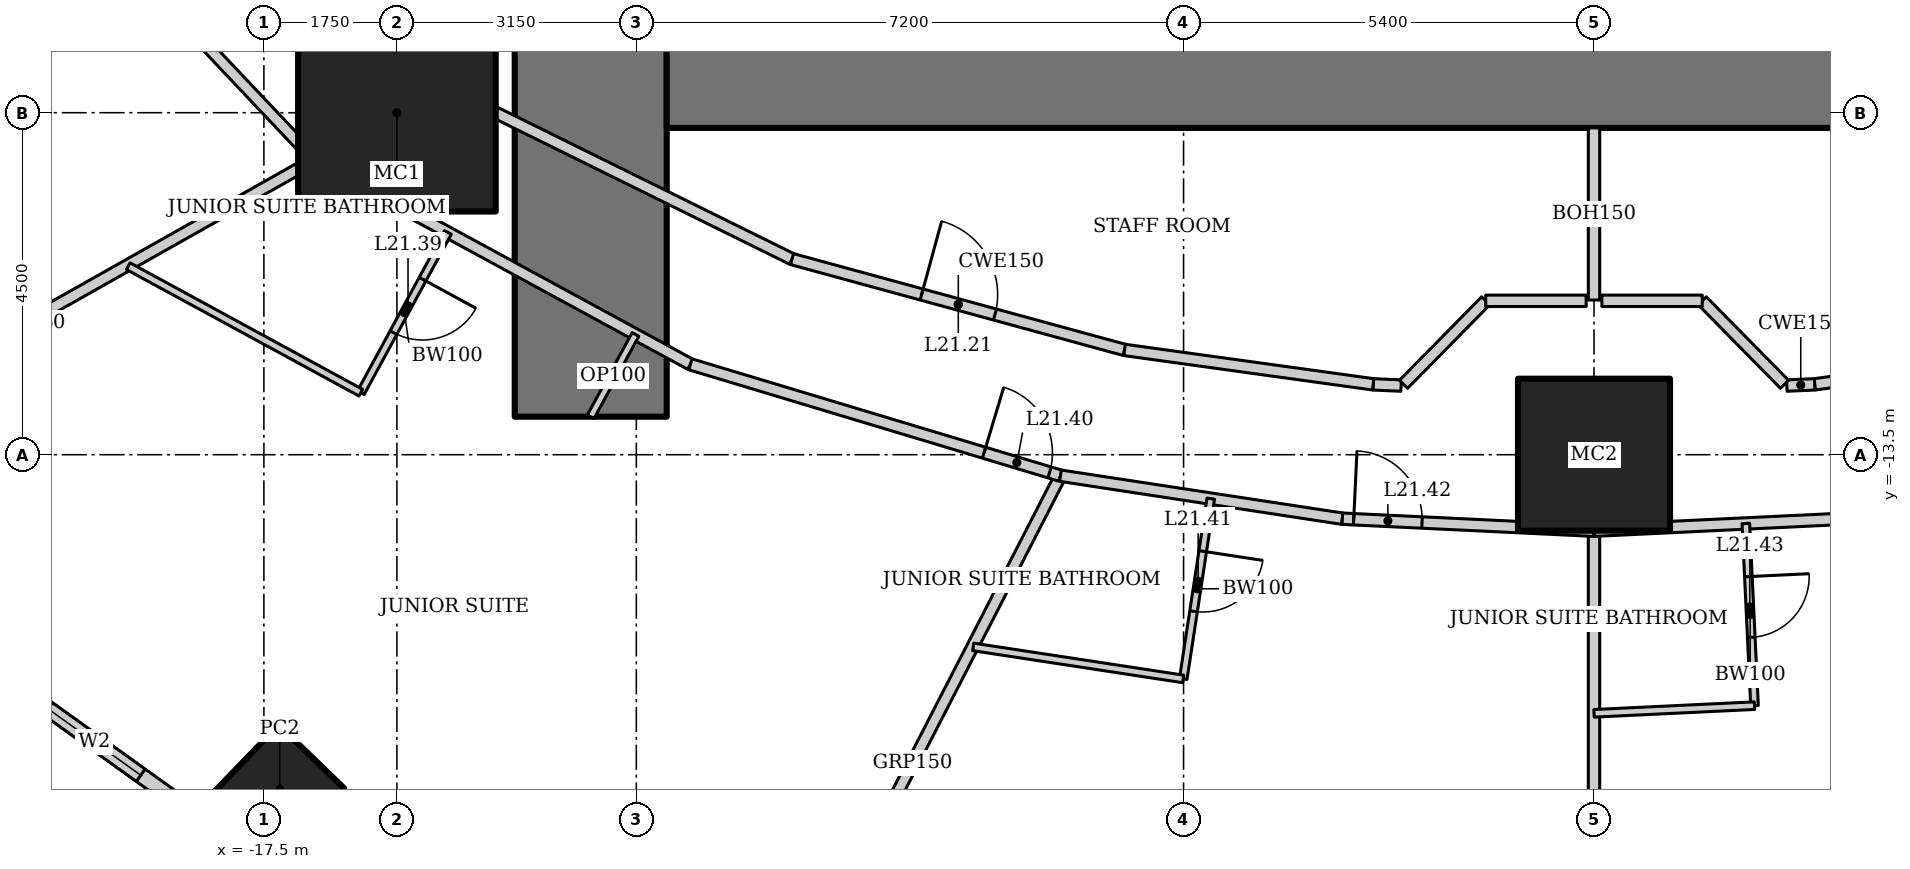
"""IFC4 building model, lengths in metres.
Left out: names, types, materials, properties, quantities, classifications, styles, units other than length and angle.
Written with IfcOpenShell. Run it as: python <this file> out.ifc"""

import sys

from ifc_helpers import new_model, si_unit, direction, frame, frame_2d, origin, origin_2d, place, context, subcontext, project, spatial, rectangle, hollow_rectangle, extrude, element, fill, save


model = new_model("IFC4")
c1 = context("Model", 3, precision=1e-05, world=origin(), true_north=direction((0.0, 1.0)))
c2 = subcontext(c1, "Body", "Model", "MODEL_VIEW")
j1 = project(units=[si_unit("LENGTHUNIT", "METRE"), si_unit("PLANEANGLEUNIT", "RADIAN")], contexts=[c1])
p1 = place(None, origin())
s1 = spatial("IfcSite", under=j1, at=p1, CompositionType="ELEMENT")
p2 = place(p1, origin())
s2 = spatial("IfcBuilding", under=s1, at=p2, CompositionType="ELEMENT")
p3 = place(p2, frame((0.0, 0.0, 91.0)))
s3 = spatial("IfcBuildingStorey", under=s2, at=p3, CompositionType="ELEMENT", Elevation=91.0)
p4 = place(p3, frame((-15.75, -9.0, 0.0), z_axis=(0.0, 0.0, 1.0), x_axis=(1.0, 0.0, 0.0)))
e1 = element("IfcColumn", 1, at=p4, inside=s3, PredefinedType="COLUMN", context=c2, shape_type="SweptSolid", body=[
    extrude(hollow_rectangle(XDim=2.6, YDim=2.6, WallThickness=0.13, at=origin_2d()), origin(), (0.0, 0.0, 1.0), 3.6),
])
p5 = place(p3, frame((0.0, -13.5, 0.0), z_axis=(0.0, 0.0, 1.0), x_axis=(1.0, 0.0, 0.0)))
e2 = element("IfcColumn", 2, at=p5, inside=s3, PredefinedType="COLUMN", context=c2, shape_type="SweptSolid", body=[
    extrude(hollow_rectangle(XDim=2.0, YDim=2.0, WallThickness=0.17, at=origin_2d()), origin(), (0.0, 0.0, 1.0), 3.6),
])
p6 = place(p3, frame((-17.291, -17.905, 0.0), z_axis=(0.0, 0.0, 1.0), x_axis=(0.694658370459, 0.719339800339, 0.0)))
e3 = element("IfcColumn", 3, at=p6, inside=s3, PredefinedType="COLUMN", context=c2, shape_type="SweptSolid", body=[
    extrude(hollow_rectangle(XDim=1.2, YDim=1.2, WallThickness=0.1, at=origin_2d()), origin(), (0.0, 0.0, 1.0), 3.6),
])
p7 = place(p3, frame((-13.2, 13.0, 0.0), z_axis=(0.0, 0.0, 1.0), x_axis=(0.0, -1.0, 0.0)))
e4 = element("IfcWall", 4, at=p7, inside=s3, PredefinedType="SHEAR", context=c2, shape_type="SweptSolid", body=[
    extrude(rectangle(XDim=26.0, YDim=2.0, at=frame_2d((13.0, 0.0))), origin(), (0.0, 0.0, 1.0), 3.6),
])
p8 = place(p7, frame((12.1, 0.0, 0.0)))
e5 = element("IfcOpeningElement", 5, at=p8, cuts=e4, PredefinedType="OPENING", context=c2, shape_type="SweptSolid", body=[
    extrude(rectangle(XDim=1.8, YDim=2.1, at=frame_2d((0.9, 1.05))), frame((0.0, 1.01, 0.0), z_axis=(0.0, -1.0, 0.0), x_axis=(1.0, 0.0, 0.0)), (0.0, 0.0, 1.0), 2.02),
])
p9 = place(p3, frame((-12.2, -8.0, 0.0), z_axis=(0.0, 0.0, 1.0), x_axis=(1.0, 0.0, 0.0)))
e6 = element("IfcWall", 6, at=p9, inside=s3, PredefinedType="SHEAR", context=c2, shape_type="SweptSolid", body=[
    extrude(rectangle(XDim=24.4, YDim=2.4, at=frame_2d((12.2, 0.0))), origin(), (0.0, 0.0, 1.0), 3.6),
])
p10 = place(p3, frame((-24.482, -13.875, 0.0), z_axis=(0.0, 0.0, 1.0), x_axis=(0.812791321576, -0.582554948112, 0.0)))
e7 = element("IfcWall", 7, at=p10, inside=s3, PredefinedType="SOLIDWALL", context=c2, shape_type="SweptSolid", body=[
    extrude(rectangle(XDim=8.063, YDim=0.2, at=frame_2d((4.032, 0.0))), origin(), (0.0, 0.0, 1.0), 3.45),
])
p11 = place(p10, frame((1.466, 0.0, 0.5)))
e8 = element("IfcOpeningElement", 8, at=p11, cuts=e7, PredefinedType="OPENING", context=c2, shape_type="SweptSolid", body=[
    extrude(rectangle(XDim=1.5, YDim=2.2, at=frame_2d((0.75, 1.1))), frame((0.0, 0.11, 0.0), z_axis=(0.0, -1.0, 0.0), x_axis=(1.0, 0.0, 0.0)), (0.0, 0.0, 1.0), 0.22),
])
p12 = place(p10, frame((5.097, 0.0, 0.5)))
e9 = element("IfcOpeningElement", 9, at=p12, cuts=e7, PredefinedType="OPENING", context=c2, shape_type="SweptSolid", body=[
    extrude(rectangle(XDim=1.5, YDim=2.2, at=frame_2d((0.75, 1.1))), frame((0.0, 0.11, 0.0), z_axis=(0.0, -1.0, 0.0), x_axis=(1.0, 0.0, 0.0)), (0.0, 0.0, 1.0), 0.22),
])
p13 = place(p3, frame((-24.435, -13.909, 0.0), z_axis=(0.0, 0.0, 1.0), x_axis=(0.87090601027, 0.491449612143, 0.0)))
e10 = element("IfcWall", 10, at=p13, inside=s3, PredefinedType="PARTITIONING", context=c2, shape_type="SweptSolid", body=[
    extrude(rectangle(XDim=8.726, YDim=0.15, at=frame_2d((4.363, 0.0))), origin(), (0.0, 0.0, 1.0), 2.693),
])
p14 = place(p3, frame((-10.912, -21.346, 0.0), z_axis=(0.0, 0.0, 1.0), x_axis=(0.457327273085, 0.889298468059, 0.0)))
e11 = element("IfcWall", 11, at=p14, inside=s3, PredefinedType="PARTITIONING", context=c2, shape_type="SweptSolid", body=[
    extrude(rectangle(XDim=8.511, YDim=0.15, at=frame_2d((4.256, 0.0))), origin(), (0.0, 0.0, 1.0), 2.528),
])
p15 = place(p3, frame((0.0, -22.825, 0.0), z_axis=(0.0, 0.0, 1.0), x_axis=(0.0, 1.0, 0.0)))
e12 = element("IfcWall", 12, at=p15, inside=s3, PredefinedType="PARTITIONING", context=c2, shape_type="SweptSolid", body=[
    extrude(rectangle(XDim=8.325, YDim=0.15, at=frame_2d((4.162, 0.0))), origin(), (0.0, 0.0, 1.0), 2.924),
])
p16 = place(p3, frame((-20.984, -5.232, 0.0), z_axis=(0.0, 0.0, 1.0), x_axis=(0.687062608696, -0.726598218916, 0.0)))
e13 = element("IfcWall", 13, at=p16, inside=s3, PredefinedType="PARTITIONING", context=c2, shape_type="SweptSolid", body=[
    extrude(rectangle(XDim=6.039, YDim=0.15, at=frame_2d((3.02, 0.0))), origin(), (0.0, 0.0, 1.0), 3.45),
])
p17 = place(p16, frame((0.15, 0.0, 0.0)))
e14 = element("IfcOpeningElement", 14, at=p17, cuts=e13, PredefinedType="OPENING", context=c2, shape_type="SweptSolid", body=[
    extrude(rectangle(XDim=0.9, YDim=2.1, at=frame_2d((0.45, 1.05))), frame((0.0, 0.085, 0.0), z_axis=(0.0, -1.0, 0.0), x_axis=(1.0, 0.0, 0.0)), (0.0, 0.0, 1.0), 0.17),
])
p18 = place(p3, frame((-16.835, -9.62, 0.0), z_axis=(0.0, 0.0, 1.0), x_axis=(0.878450059298, -0.477834169267, 0.0)))
e15 = element("IfcWall", 15, at=p18, inside=s3, PredefinedType="PARTITIONING", context=c2, shape_type="SweptSolid", body=[
    extrude(rectangle(XDim=5.631, YDim=0.15, at=frame_2d((2.815, 0.0))), origin(), (0.0, 0.0, 1.0), 3.45),
])
p19 = place(p3, frame((-11.888, -12.311, 0.0), z_axis=(0.0, 0.0, 1.0), x_axis=(0.957564241242, -0.288219922793, 0.0)))
e16 = element("IfcWall", 16, at=p19, inside=s3, PredefinedType="PARTITIONING", context=c2, shape_type="SweptSolid", body=[
    extrude(rectangle(XDim=5.085, YDim=0.15, at=frame_2d((2.542, 0.0))), origin(), (0.0, 0.0, 1.0), 3.45),
])
p20 = place(p19, frame((4.035, 0.0, 0.0)))
e17 = element("IfcOpeningElement", 17, at=p20, cuts=e16, PredefinedType="OPENING", context=c2, shape_type="SweptSolid", body=[
    extrude(rectangle(XDim=0.9, YDim=2.1, at=frame_2d((0.45, 1.05))), frame((0.0, 0.085, 0.0), z_axis=(0.0, -1.0, 0.0), x_axis=(1.0, 0.0, 0.0)), (0.0, 0.0, 1.0), 0.17),
])
p21 = place(p3, frame((-7.019, -13.776, 0.0), z_axis=(0.0, 0.0, 1.0), x_axis=(0.988564270062, -0.150800145746, 0.0)))
e18 = element("IfcWall", 18, at=p21, inside=s3, PredefinedType="PARTITIONING", context=c2, shape_type="SweptSolid", body=[
    extrude(rectangle(XDim=3.751, YDim=0.15, at=frame_2d((1.875, 0.0))), origin(), (0.0, 0.0, 1.0), 3.45),
])
p22 = place(p3, frame((-3.311, -14.342, 0.0), z_axis=(0.0, 0.0, 1.0), x_axis=(0.998863968075, -0.047652631422, 0.0)))
e19 = element("IfcWall", 19, at=p22, inside=s3, PredefinedType="PARTITIONING", context=c2, shape_type="SweptSolid", body=[
    extrude(rectangle(XDim=3.315, YDim=0.15, at=frame_2d((1.657, 0.0))), origin(), (0.0, 0.0, 1.0), 3.45),
])
p23 = place(p22, frame((0.15, 0.0, 0.0)))
e20 = element("IfcOpeningElement", 20, at=p23, cuts=e19, PredefinedType="OPENING", context=c2, shape_type="SweptSolid", body=[
    extrude(rectangle(XDim=0.9, YDim=2.1, at=frame_2d((0.45, 1.05))), frame((0.0, 0.085, 0.0), z_axis=(0.0, -1.0, 0.0), x_axis=(1.0, 0.0, 0.0)), (0.0, 0.0, 1.0), 0.17),
])
p24 = place(p3, frame((0.0, -14.5, 0.0), z_axis=(0.0, 0.0, 1.0), x_axis=(0.998863968075, 0.047652631422, 0.0)))
e21 = element("IfcWall", 21, at=p24, inside=s3, PredefinedType="PARTITIONING", context=c2, shape_type="SweptSolid", body=[
    extrude(rectangle(XDim=3.315, YDim=0.15, at=frame_2d((1.657, 0.0))), origin(), (0.0, 0.0, 1.0), 3.45),
])
p25 = place(p3, frame((-19.177, -4.781, 0.0), z_axis=(0.0, 0.0, 1.0), x_axis=(0.720837261072, -0.693104352209, 0.0)))
e22 = element("IfcWall", 22, at=p25, inside=s3, PredefinedType="PARTITIONING", context=c2, shape_type="SweptSolid", body=[
    extrude(rectangle(XDim=5.59, YDim=0.15, at=frame_2d((2.795, 0.0))), origin(), (0.0, 0.0, 1.0), 3.45),
])
p26 = place(p25, frame((2.295, 0.0, 0.0)))
e23 = element("IfcOpeningElement", 23, at=p26, cuts=e22, PredefinedType="OPENING", context=c2, shape_type="SweptSolid", body=[
    extrude(rectangle(XDim=1.0, YDim=2.1, at=frame_2d((0.5, 1.05))), frame((0.0, 0.085, 0.0), z_axis=(0.0, -1.0, 0.0), x_axis=(1.0, 0.0, 0.0)), (0.0, 0.0, 1.0), 0.17),
])
p27 = place(p3, frame((-15.147, -8.656, 0.0), z_axis=(0.0, 0.0, 1.0), x_axis=(0.89656943448, -0.442903205177, 0.0)))
e24 = element("IfcWall", 24, at=p27, inside=s3, PredefinedType="PARTITIONING", context=c2, shape_type="SweptSolid", body=[
    extrude(rectangle(XDim=5.126, YDim=0.15, at=frame_2d((2.563, 0.0))), origin(), (0.0, 0.0, 1.0), 3.45),
])
p28 = place(p3, frame((-10.551, -10.926, 0.0), z_axis=(0.0, 0.0, 1.0), x_axis=(0.964644466646, -0.263554648923, 0.0)))
e25 = element("IfcWall", 25, at=p28, inside=s3, PredefinedType="PARTITIONING", context=c2, shape_type="SweptSolid", body=[
    extrude(rectangle(XDim=4.535, YDim=0.15, at=frame_2d((2.268, 0.0))), origin(), (0.0, 0.0, 1.0), 3.45),
])
p29 = place(p28, frame((1.768, 0.0, 0.0)))
e26 = element("IfcOpeningElement", 26, at=p29, cuts=e25, PredefinedType="OPENING", context=c2, shape_type="SweptSolid", body=[
    extrude(rectangle(XDim=1.0, YDim=2.1, at=frame_2d((0.5, 1.05))), frame((0.0, 0.085, 0.0), z_axis=(0.0, -1.0, 0.0), x_axis=(1.0, 0.0, 0.0)), (0.0, 0.0, 1.0), 0.17),
])
for number, where, z_axis, x_axis in (
    (27, (-6.176, -12.122, 0.0), (0.0, 0.0, 1.0), (0.991, -0.137, 0.0)),
    (28, (2.903, -12.574, 0.0), (0.0, 0.0, 1.0), (0.991, 0.137, 0.0)),
):
    element("IfcWall", number, at=place(p3, frame(where, z_axis=z_axis, x_axis=x_axis)), inside=s3, PredefinedType="PARTITIONING", context=c2, shape_type="SweptSolid", body=[
        extrude(rectangle(XDim=3.304, YDim=0.15, at=frame_2d((1.652, 0.0))), origin(), (0.0, 0.0, 1.0), 3.45),
    ])
p30 = place(p3, frame((-15.078, -10.576, 0.0), z_axis=(0.0, 0.0, 1.0), x_axis=(-0.477832549678, -0.878450940274, 0.0)))
e29 = element("IfcWall", 29, at=p30, inside=s3, PredefinedType="PARTITIONING", context=c2, shape_type="SweptSolid", body=[
    extrude(rectangle(XDim=2.4, YDim=0.1, at=frame_2d((1.2, 0.0))), origin(), (0.0, 0.0, 1.0), 3.45),
])
p31 = place(p30, frame((0.7, 0.0, 0.0)))
e30 = element("IfcOpeningElement", 30, at=p31, cuts=e29, PredefinedType="OPENING", context=c2, shape_type="SweptSolid", body=[
    extrude(rectangle(XDim=0.8, YDim=2.1, at=frame_2d((0.4, 1.05))), frame((0.0, 0.06, 0.0), z_axis=(0.0, -1.0, 0.0), x_axis=(1.0, 0.0, 0.0)), (0.0, 0.0, 1.0), 0.12),
])
p32 = place(p3, frame((-16.225, -12.684, 0.0), z_axis=(0.0, 0.0, 1.0), x_axis=(-0.878473578893, 0.477790928322, 0.0)))
e31 = element("IfcWall", 31, at=p32, inside=s3, PredefinedType="PARTITIONING", context=c2, shape_type="SweptSolid", body=[
    extrude(rectangle(XDim=3.483, YDim=0.1, at=frame_2d((1.741, 0.0))), origin(), (0.0, 0.0, 1.0), 3.45),
])
p33 = place(p3, frame((-5.042, -14.078, 0.0), z_axis=(0.0, 0.0, 1.0), x_axis=(-0.150856962013, -0.988555601376, 0.0)))
e32 = element("IfcWall", 32, at=p33, inside=s3, PredefinedType="PARTITIONING", context=c2, shape_type="SweptSolid", body=[
    extrude(rectangle(XDim=2.4, YDim=0.1, at=frame_2d((1.2, 0.0))), origin(), (0.0, 0.0, 1.0), 3.45),
])
p34 = place(p33, frame((0.7, 0.0, 0.0)))
e33 = element("IfcOpeningElement", 33, at=p34, cuts=e32, PredefinedType="OPENING", context=c2, shape_type="SweptSolid", body=[
    extrude(rectangle(XDim=0.8, YDim=2.1, at=frame_2d((0.4, 1.05))), frame((0.0, 0.06, 0.0), z_axis=(0.0, -1.0, 0.0), x_axis=(1.0, 0.0, 0.0)), (0.0, 0.0, 1.0), 0.12),
])
p35 = place(p3, frame((-5.404, -16.45, 0.0), z_axis=(0.0, 0.0, 1.0), x_axis=(-0.988568792086, 0.150770498819, 0.0)))
e34 = element("IfcWall", 34, at=p35, inside=s3, PredefinedType="PARTITIONING", context=c2, shape_type="SweptSolid", body=[
    extrude(rectangle(XDim=2.795, YDim=0.1, at=frame_2d((1.397, 0.0))), origin(), (0.0, 0.0, 1.0), 3.45),
])
p36 = place(p3, frame((1.998, -14.405, 0.0), z_axis=(0.0, 0.0, 1.0), x_axis=(0.047608648396, -0.998866065395, 0.0)))
e35 = element("IfcWall", 35, at=p36, inside=s3, PredefinedType="PARTITIONING", context=c2, shape_type="SweptSolid", body=[
    extrude(rectangle(XDim=2.4, YDim=0.1, at=frame_2d((1.2, 0.0))), origin(), (0.0, 0.0, 1.0), 2.749),
])
p37 = place(p36, frame((0.7, 0.0, 0.0)))
e36 = element("IfcOpeningElement", 36, at=p37, cuts=e35, PredefinedType="OPENING", context=c2, shape_type="SweptSolid", body=[
    extrude(rectangle(XDim=0.8, YDim=2.1, at=frame_2d((0.4, 1.05))), frame((0.0, 0.06, 0.0), z_axis=(0.0, -1.0, 0.0), x_axis=(1.0, 0.0, 0.0)), (0.0, 0.0, 1.0), 0.12),
])
p38 = place(p3, frame((2.112, -16.802, 0.0), z_axis=(0.0, 0.0, 1.0), x_axis=(-0.998862383453, -0.047685835668, 0.0)))
e37 = element("IfcWall", 37, at=p38, inside=s3, PredefinedType="PARTITIONING", context=c2, shape_type="SweptSolid", body=[
    extrude(rectangle(XDim=2.115, YDim=0.1, at=frame_2d((1.057, 0.0))), origin(), (0.0, 0.0, 1.0), 3.45),
])
p39 = place(p3, frame((-13.2, -13.0, 0.0), z_axis=(0.0, 0.0, 1.0), x_axis=(0.477852414256, 0.878440134665, 0.0)))
e38 = element("IfcWall", 38, at=p39, inside=s3, PredefinedType="PARTITIONING", context=c2, shape_type="SweptSolid", body=[
    extrude(rectangle(XDim=1.232, YDim=0.1, at=frame_2d((0.616, 0.0))), origin(), (0.0, 0.0, 1.0), 3.45),
])
for number, where, z_axis, x_axis in (
    (39, (-2.903, -12.574, 0.0), (0.0, 0.0, 1.0), (0.999, -0.043, 0.0)),
    (40, (2.537, -12.59, 0.0), (0.0, 0.0, 1.0), (0.999, 0.043, 0.0)),
):
    element("IfcWall", number, at=place(p3, frame(where, z_axis=z_axis, x_axis=x_axis)), inside=s3, PredefinedType="PARTITIONING", context=c2, shape_type="SweptSolid", body=[
        extrude(rectangle(XDim=0.366, YDim=0.15, at=frame_2d((0.183, 0.0))), origin(), (0.0, 0.0, 1.0), 3.45),
    ])
p40 = place(p3, frame((0.0, -9.2, 0.0), z_axis=(0.0, 0.0, 1.0), x_axis=(0.0, -1.0, 0.0)))
e41 = element("IfcWall", 41, at=p40, inside=s3, PredefinedType="PARTITIONING", context=c2, shape_type="SweptSolid", body=[
    extrude(rectangle(XDim=2.265, YDim=0.15, at=frame_2d((1.133, 0.0))), origin(), (0.0, 0.0, 1.0), 3.044),
])
p41 = place(p3, frame((-2.506, -12.574, 0.0), z_axis=(0.0, 0.0, 1.0), x_axis=(0.701622806479, 0.712548550927, 0.0)))
e42 = element("IfcWall", 42, at=p41, inside=s3, PredefinedType="PARTITIONING", context=c2, shape_type="SweptSolid", body=[
    extrude(rectangle(XDim=1.542, YDim=0.15, at=frame_2d((0.771, 0.0))), origin(), (0.0, 0.0, 1.0), 3.45),
])
p42 = place(p3, frame((-1.425, -11.475, 0.0), z_axis=(0.0, 0.0, 1.0), x_axis=(1.0, 0.0, 0.0)))
e43 = element("IfcWall", 43, at=p42, inside=s3, PredefinedType="PARTITIONING", context=c2, shape_type="SweptSolid", body=[
    extrude(rectangle(XDim=1.321, YDim=0.15, at=frame_2d((0.661, 0.0))), origin(), (0.0, 0.0, 1.0), 3.45),
])
p43 = place(p3, frame((1.425, -11.475, 0.0), z_axis=(0.0, 0.0, 1.0), x_axis=(0.701622806479, -0.712548550927, 0.0)))
e44 = element("IfcWall", 44, at=p43, inside=s3, PredefinedType="PARTITIONING", context=c2, shape_type="SweptSolid", body=[
    extrude(rectangle(XDim=1.542, YDim=0.15, at=frame_2d((0.771, 0.0))), origin(), (0.0, 0.0, 1.0), 3.45),
])
p44 = place(p3, frame((0.103, -11.475, 0.0), z_axis=(0.0, 0.0, 1.0), x_axis=(1.0, 0.0, 0.0)))
e45 = element("IfcWall", 45, at=p44, inside=s3, PredefinedType="PARTITIONING", context=c2, shape_type="SweptSolid", body=[
    extrude(rectangle(XDim=1.321, YDim=0.15, at=frame_2d((0.661, 0.0))), origin(), (0.0, 0.0, 1.0), 3.45),
])
p45 = place(p12, origin())
e46 = element("IfcWindow", 46, at=p45, inside=s3, PartitioningType="SINGLE_PANEL", PredefinedType="WINDOW", context=c2, shape_type="SweptSolid", body=[
    extrude(rectangle(XDim=1.5, YDim=2.2, at=frame_2d((0.75, 1.1))), frame((0.0, 0.03, 0.0), z_axis=(0.0, -1.0, 0.0), x_axis=(1.0, 0.0, 0.0)), (0.0, 0.0, 1.0), 0.06),
])
fill(e9, e46)
p46 = place(p29, origin())
e47 = element("IfcDoor", 47, at=p46, inside=s3, OperationType="SINGLE_SWING_LEFT", PredefinedType="DOOR", context=c2, shape_type="SweptSolid", body=[
    extrude(rectangle(XDim=1.0, YDim=2.1, at=frame_2d((0.5, 1.05))), frame((0.0, 0.025, 0.0), z_axis=(0.0, -1.0, 0.0), x_axis=(1.0, 0.0, 0.0)), (0.0, 0.0, 1.0), 0.05),
])
fill(e26, e47)
p47 = place(p31, origin())
e48 = element("IfcDoor", 48, at=p47, inside=s3, OperationType="SINGLE_SWING_LEFT", PredefinedType="DOOR", context=c2, shape_type="SweptSolid", body=[
    extrude(rectangle(XDim=0.8, YDim=2.1, at=frame_2d((0.4, 1.05))), frame((0.0, 0.025, 0.0), z_axis=(0.0, -1.0, 0.0), x_axis=(1.0, 0.0, 0.0)), (0.0, 0.0, 1.0), 0.05),
])
fill(e30, e48)
p48 = place(p20, origin())
e49 = element("IfcDoor", 49, at=p48, inside=s3, OperationType="SINGLE_SWING_LEFT", PredefinedType="DOOR", context=c2, shape_type="SweptSolid", body=[
    extrude(rectangle(XDim=0.9, YDim=2.1, at=frame_2d((0.45, 1.05))), frame((0.0, 0.025, 0.0), z_axis=(0.0, -1.0, 0.0), x_axis=(1.0, 0.0, 0.0)), (0.0, 0.0, 1.0), 0.05),
])
fill(e17, e49)
p49 = place(p34, origin())
e50 = element("IfcDoor", 50, at=p49, inside=s3, OperationType="SINGLE_SWING_LEFT", PredefinedType="DOOR", context=c2, shape_type="SweptSolid", body=[
    extrude(rectangle(XDim=0.8, YDim=2.1, at=frame_2d((0.4, 1.05))), frame((0.0, 0.025, 0.0), z_axis=(0.0, -1.0, 0.0), x_axis=(1.0, 0.0, 0.0)), (0.0, 0.0, 1.0), 0.05),
])
fill(e33, e50)
p50 = place(p23, origin())
e51 = element("IfcDoor", 51, at=p50, inside=s3, OperationType="SINGLE_SWING_LEFT", PredefinedType="DOOR", context=c2, shape_type="SweptSolid", body=[
    extrude(rectangle(XDim=0.9, YDim=2.1, at=frame_2d((0.45, 1.05))), frame((0.0, 0.025, 0.0), z_axis=(0.0, -1.0, 0.0), x_axis=(1.0, 0.0, 0.0)), (0.0, 0.0, 1.0), 0.05),
])
fill(e20, e51)
p51 = place(p37, origin())
e52 = element("IfcDoor", 52, at=p51, inside=s3, OperationType="SINGLE_SWING_LEFT", PredefinedType="DOOR", context=c2, shape_type="SweptSolid", body=[
    extrude(rectangle(XDim=0.8, YDim=2.1, at=frame_2d((0.4, 1.05))), frame((0.0, 0.025, 0.0), z_axis=(0.0, -1.0, 0.0), x_axis=(1.0, 0.0, 0.0)), (0.0, 0.0, 1.0), 0.05),
])
fill(e36, e52)
save(model, sys.argv[1])
